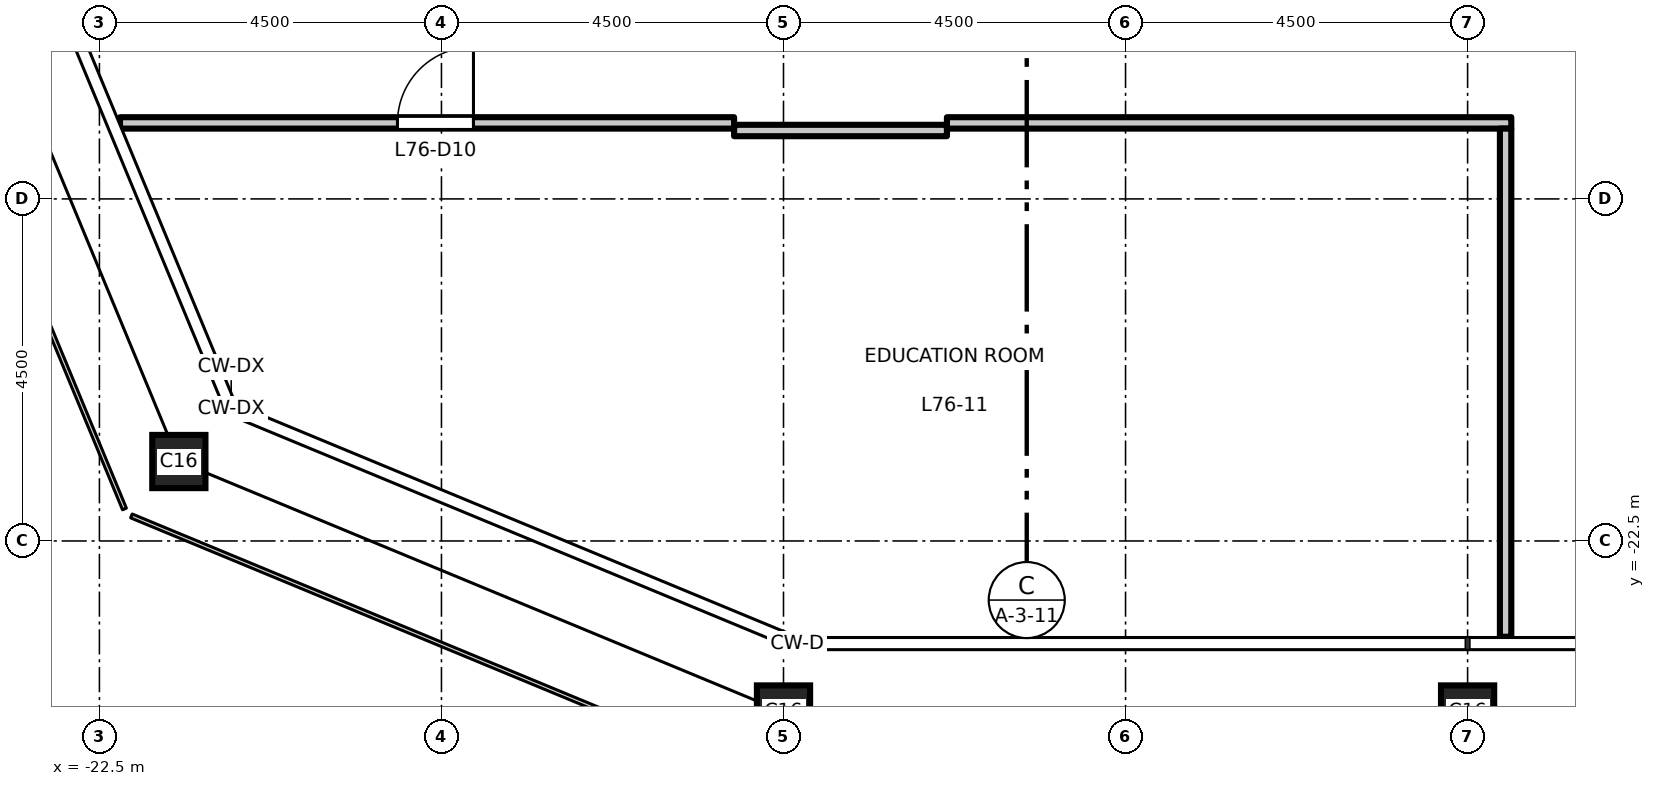
"""IFC4 building model, lengths in metres.
Left out: names, types, materials, properties, quantities, classifications, styles, units other than length and angle.
Written with IfcOpenShell. Run it as: python <this file> out.ifc"""

import sys

from ifc_helpers import new_model, si_unit, direction, frame, frame_2d, origin, origin_2d, place, context, subcontext, project, spatial, rectangle, hollow_rectangle, extrude, element, fill, save


model = new_model("IFC4")
c1 = context("Model", 3, precision=1e-05, world=origin(), true_north=direction((0.0, 1.0)))
c2 = subcontext(c1, "Body", "Model", "MODEL_VIEW")
j1 = project(units=[si_unit("LENGTHUNIT", "METRE"), si_unit("PLANEANGLEUNIT", "RADIAN")], contexts=[c1])
p1 = place(None, origin())
s1 = spatial("IfcSite", under=j1, at=p1, CompositionType="ELEMENT")
p2 = place(p1, origin())
s2 = spatial("IfcBuilding", under=s1, at=p2, CompositionType="ELEMENT")
p3 = place(p2, frame((0.0, 0.0, 353.2)))
s3 = spatial("IfcBuildingStorey", under=s2, at=p3, CompositionType="ELEMENT", Elevation=353.2)
for number, where, z_axis, x_axis in (
    (1, (-13.5, -24.75, 0.0), (0.0, 0.0, 1.0), (1.0, 0.0, 0.0)),
    (2, (-4.5, -24.75, 0.0), (0.0, 0.0, 1.0), (1.0, 0.0, 0.0)),
    (3, (-21.455, -21.455, 0.0), (0.0, 0.0, 1.0), (1.0, 0.0, 0.0)),
):
    element("IfcColumn", number, at=place(p3, frame(where, z_axis=z_axis, x_axis=x_axis)), inside=s3, PredefinedType="COLUMN", context=c2, shape_type="SweptSolid", body=[
        extrude(hollow_rectangle(XDim=0.7, YDim=0.7, WallThickness=0.036, at=origin_2d()), origin(), (0.0, 0.0, 1.0), 5.0),
    ])
p4 = place(p3, frame((-14.15, -17.1, 0.0), z_axis=(0.0, 0.0, 1.0), x_axis=(1.0, 0.0, 0.0)))
e4 = element("IfcWall", 4, at=p4, inside=s3, PredefinedType="PARTITIONING", context=c2, shape_type="SweptSolid", body=[
    extrude(rectangle(XDim=2.8, YDim=0.15, at=frame_2d((1.4, 0.0))), origin(), (0.0, 0.0, 1.0), 4.8),
])
p5 = place(p3, frame((-22.229, -17.0, 0.0), z_axis=(0.0, 0.0, 1.0), x_axis=(1.0, 0.0, 0.0)))
e5 = element("IfcWall", 5, at=p5, inside=s3, PredefinedType="PARTITIONING", context=c2, shape_type="SweptSolid", body=[
    extrude(rectangle(XDim=8.079, YDim=0.15, at=frame_2d((4.04, 0.0))), origin(), (0.0, 0.0, 1.0), 4.8),
])
p6 = place(p5, frame((3.65, 0.0, 0.0)))
e6 = element("IfcOpeningElement", 6, at=p6, cuts=e5, PredefinedType="OPENING", context=c2, shape_type="SweptSolid", body=[
    extrude(rectangle(XDim=1.0, YDim=2.1, at=frame_2d((0.5, 1.05))), frame((0.0, 0.085, 0.0), z_axis=(0.0, -1.0, 0.0), x_axis=(1.0, 0.0, 0.0)), (0.0, 0.0, 1.0), 0.17),
])
p7 = place(p3, frame((-11.35, -17.0, 0.0), z_axis=(0.0, 0.0, 1.0), x_axis=(1.0, 0.0, 0.0)))
e7 = element("IfcWall", 7, at=p7, inside=s3, PredefinedType="PARTITIONING", context=c2, shape_type="SweptSolid", body=[
    extrude(rectangle(XDim=7.425, YDim=0.15, at=frame_2d((3.712, 0.0))), origin(), (0.0, 0.0, 1.0), 4.8),
])
p8 = place(p3, frame((-4.0, -23.76, 0.0), z_axis=(0.0, 0.0, 1.0), x_axis=(0.0, 1.0, 0.0)))
e8 = element("IfcWall", 8, at=p8, inside=s3, PredefinedType="PARTITIONING", context=c2, shape_type="SweptSolid", body=[
    extrude(rectangle(XDim=6.685, YDim=0.15, at=frame_2d((3.343, 0.0))), origin(), (0.0, 0.0, 1.0), 4.8),
])
p9 = place(p6, origin())
e9 = element("IfcDoor", 9, at=p9, inside=s3, OperationType="SINGLE_SWING_RIGHT", PredefinedType="DOOR", context=c2, shape_type="SweptSolid", body=[
    extrude(rectangle(XDim=1.0, YDim=2.1, at=frame_2d((0.5, 1.05))), frame((0.0, 0.025, 0.0), z_axis=(0.0, -1.0, 0.0), x_axis=(1.0, 0.0, 0.0)), (0.0, 0.0, 1.0), 0.05),
])
fill(e6, e9)
save(model, sys.argv[1])
